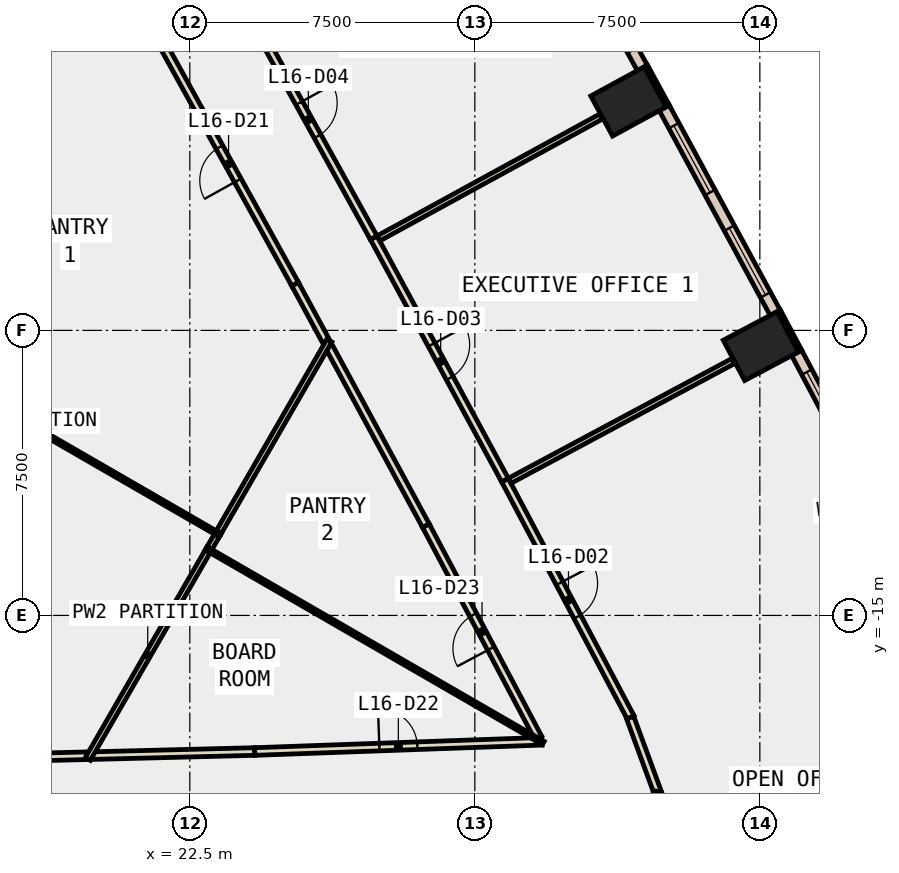
"""IFC4 building model, lengths in metres.
Left out: names, types, materials, properties, quantities, classifications, styles, units other than length and angle.
Written with IfcOpenShell. Run it as: python <this file> out.ifc"""

import sys

from ifc_helpers import new_model, si_unit, direction, frame, frame_2d, origin, origin_2d, place, context, subcontext, project, spatial, rectangle, extrude, element, fill, save


model = new_model("IFC4")
c1 = context("Model", 3, precision=1e-05, world=origin(), true_north=direction((0.0, 1.0)))
c2 = subcontext(c1, "Body", "Model", "MODEL_VIEW")
j1 = project(units=[si_unit("LENGTHUNIT", "METRE"), si_unit("PLANEANGLEUNIT", "RADIAN")], contexts=[c1])
p1 = place(None, origin())
s1 = spatial("IfcSite", under=j1, at=p1, CompositionType="ELEMENT")
p2 = place(p1, origin())
s2 = spatial("IfcBuilding", under=s1, at=p2, CompositionType="ELEMENT")
p3 = place(p2, frame((0.0, 0.0, 77.0)))
s3 = spatial("IfcBuildingStorey", under=s2, at=p3, CompositionType="ELEMENT", Elevation=77.0)
for number, where, z_axis, x_axis in (
    (1, (37.526, -7.914, -0.4), (0.0, 0.0, 1.0), (-0.469, 0.883, 0.0)),
    (2, (34.041, -1.477, -0.4), (0.0, 0.0, 1.0), (-0.478, 0.878, 0.0)),
):
    element("IfcColumn", number, at=place(p3, frame(where, z_axis=z_axis, x_axis=x_axis)), inside=s3, PredefinedType="COLUMN", context=c2, shape_type="SweptSolid", body=[
        extrude(rectangle(XDim=1.2, YDim=1.6, at=origin_2d()), origin(), (0.0, 0.0, 1.0), 4.0),
    ])
p4 = place(p3, frame((38.558, -8.045, 0.0), z_axis=(0.0, 0.0, 1.0), x_axis=(-0.469467784567, 0.882949601763, 0.0)))
e3 = element("IfcWall", 3, at=p4, inside=s3, PredefinedType="STANDARD", context=c2, shape_type="SweptSolid", body=[
    extrude(rectangle(XDim=1.199, YDim=0.1, at=frame_2d((0.6, 0.0))), origin(), (0.0, 0.0, 1.0), 3.6),
])
p5 = place(p3, frame((35.074, -1.598, 0.0), z_axis=(0.0, 0.0, 1.0), x_axis=(-0.478267644701, 0.878214131082, 0.0)))
e4 = element("IfcWall", 4, at=p5, inside=s3, PredefinedType="STANDARD", context=c2, shape_type="SweptSolid", body=[
    extrude(rectangle(XDim=1.2, YDim=0.1, at=frame_2d((0.6, 0.0))), origin(), (0.0, 0.0, 1.0), 3.6),
])
p6 = place(p3, frame((41.409, -13.644, 0.0), z_axis=(0.0, 0.0, 1.0), x_axis=(-0.467968066899, 0.883745375299, 0.0)))
e5 = element("IfcWall", 5, at=p6, inside=s3, PredefinedType="STANDARD", context=c2, shape_type="SweptSolid", body=[
    extrude(rectangle(XDim=6.282, YDim=0.3, at=frame_2d((3.141, 0.0))), origin(), (0.0, 0.0, 1.0), 3.6),
])
p7 = place(p6, frame((0.571, 0.0, 0.9)))
e6 = element("IfcOpeningElement", 6, at=p7, cuts=e5, PredefinedType="OPENING", context=c2, shape_type="SweptSolid", body=[
    extrude(rectangle(XDim=2.0, YDim=2.6, at=frame_2d((1.0, 1.3))), frame((0.0, 0.16, 0.0), z_axis=(0.0, -1.0, 0.0), x_axis=(1.0, 0.0, 0.0)), (0.0, 0.0, 1.0), 0.32),
])
p8 = place(p6, frame((3.712, 0.0, 0.9)))
e7 = element("IfcOpeningElement", 7, at=p8, cuts=e5, PredefinedType="OPENING", context=c2, shape_type="SweptSolid", body=[
    extrude(rectangle(XDim=2.0, YDim=2.6, at=frame_2d((1.0, 1.3))), frame((0.0, 0.16, 0.0), z_axis=(0.0, -1.0, 0.0), x_axis=(1.0, 0.0, 0.0)), (0.0, 0.0, 1.0), 0.32),
])
p9 = place(p3, frame((37.903, -7.036, 0.0), z_axis=(0.0, 0.0, 1.0), x_axis=(-0.476174096946, 0.879351027404, 0.0)))
e8 = element("IfcWall", 8, at=p9, inside=s3, PredefinedType="STANDARD", context=c2, shape_type="SweptSolid", body=[
    extrude(rectangle(XDim=6.131, YDim=0.3, at=frame_2d((3.065, 0.0))), origin(), (0.0, 0.0, 1.0), 3.6),
])
p10 = place(p9, frame((0.533, 0.0, 0.9)))
e9 = element("IfcOpeningElement", 9, at=p10, cuts=e8, PredefinedType="OPENING", context=c2, shape_type="SweptSolid", body=[
    extrude(rectangle(XDim=2.0, YDim=2.6, at=frame_2d((1.0, 1.3))), frame((0.0, 0.16, 0.0), z_axis=(0.0, -1.0, 0.0), x_axis=(1.0, 0.0, 0.0)), (0.0, 0.0, 1.0), 0.32),
])
p11 = place(p9, frame((3.598, 0.0, 0.9)))
e10 = element("IfcOpeningElement", 10, at=p11, cuts=e8, PredefinedType="OPENING", context=c2, shape_type="SweptSolid", body=[
    extrude(rectangle(XDim=2.0, YDim=2.6, at=frame_2d((1.0, 1.3))), frame((0.0, 0.16, 0.0), z_axis=(0.0, -1.0, 0.0), x_axis=(1.0, 0.0, 0.0)), (0.0, 0.0, 1.0), 0.32),
])
p12 = place(p3, frame((34.409, -0.595, 0.0), z_axis=(0.0, 0.0, 1.0), x_axis=(-0.484025698618, 0.875053782963, 0.0)))
e11 = element("IfcWall", 11, at=p12, inside=s3, PredefinedType="STANDARD", context=c2, shape_type="SweptSolid", body=[
    extrude(rectangle(XDim=6.13, YDim=0.3, at=frame_2d((3.065, 0.0))), origin(), (0.0, 0.0, 1.0), 3.6),
])
p13 = place(p12, frame((0.532, 0.0, 0.9)))
e12 = element("IfcOpeningElement", 12, at=p13, cuts=e11, PredefinedType="OPENING", context=c2, shape_type="SweptSolid", body=[
    extrude(rectangle(XDim=2.0, YDim=2.6, at=frame_2d((1.0, 1.3))), frame((0.0, 0.16, 0.0), z_axis=(0.0, -1.0, 0.0), x_axis=(1.0, 0.0, 0.0)), (0.0, 0.0, 1.0), 0.32),
])
p14 = place(p12, frame((3.597, 0.0, 0.9)))
e13 = element("IfcOpeningElement", 13, at=p14, cuts=e11, PredefinedType="OPENING", context=c2, shape_type="SweptSolid", body=[
    extrude(rectangle(XDim=2.0, YDim=2.6, at=frame_2d((1.0, 1.3))), frame((0.0, 0.16, 0.0), z_axis=(0.0, -1.0, 0.0), x_axis=(1.0, 0.0, 0.0)), (0.0, 0.0, 1.0), 0.32),
])
p15 = place(p3, frame((15.951, -18.789, 0.0), z_axis=(0.0, 0.0, 1.0), x_axis=(0.999680018084, 0.025295482688, 0.0)))
e14 = element("IfcWall", 14, at=p15, inside=s3, PredefinedType="PARTITIONING", context=c2, shape_type="SweptSolid", body=[
    extrude(rectangle(XDim=3.841, YDim=0.2, at=frame_2d((1.921, 0.0))), origin(), (0.0, 0.0, 1.0), 3.6),
])
p16 = place(p3, frame((26.086, -7.789, 0.0), z_axis=(0.0, 0.0, 1.0), x_axis=(-0.475856505621, 0.879522930945, 0.0)))
e15 = element("IfcWall", 15, at=p16, inside=s3, PredefinedType="PARTITIONING", context=c2, shape_type="SweptSolid", body=[
    extrude(rectangle(XDim=1.715, YDim=0.2, at=frame_2d((0.857, 0.0))), origin(), (0.0, 0.0, 1.0), 3.6),
])
p17 = place(p3, frame((25.27, -6.281, 0.0), z_axis=(0.0, 0.0, 1.0), x_axis=(-0.484062485326, 0.875033433818, 0.0)))
e16 = element("IfcWall", 16, at=p17, inside=s3, PredefinedType="PARTITIONING", context=c2, shape_type="SweptSolid", body=[
    extrude(rectangle(XDim=7.23, YDim=0.2, at=frame_2d((3.615, 0.0))), origin(), (0.0, 0.0, 1.0), 3.6),
])
p18 = place(p17, frame((3.115, 0.0, 0.0)))
e17 = element("IfcOpeningElement", 17, at=p18, cuts=e16, PredefinedType="OPENING", context=c2, shape_type="SweptSolid", body=[
    extrude(rectangle(XDim=1.0, YDim=2.1, at=frame_2d((0.5, 1.05))), frame((0.0, 0.11, 0.0), z_axis=(0.0, -1.0, 0.0), x_axis=(1.0, 0.0, 0.0)), (0.0, 0.0, 1.0), 0.22),
])
p19 = place(p3, frame((19.941, -18.689, 0.0), z_axis=(0.0, 0.0, 1.0), x_axis=(0.999680388185, 0.025280852018, 0.0)))
e18 = element("IfcWall", 18, at=p19, inside=s3, PredefinedType="PARTITIONING", context=c2, shape_type="SweptSolid", body=[
    extrude(rectangle(XDim=4.269, YDim=0.2, at=frame_2d((2.134, 0.0))), origin(), (0.0, 0.0, 1.0), 3.6),
])
p20 = place(p3, frame((24.208, -18.581, 0.0), z_axis=(0.0, 0.0, 1.0), x_axis=(0.99936260762, 0.035698438215, 0.0)))
e19 = element("IfcWall", 19, at=p20, inside=s3, PredefinedType="PARTITIONING", context=c2, shape_type="SweptSolid", body=[
    extrude(rectangle(XDim=7.564, YDim=0.2, at=frame_2d((3.782, 0.0))), origin(), (0.0, 0.0, 1.0), 3.6),
])
p21 = place(p20, frame((3.282, 0.0, 0.0)))
e20 = element("IfcOpeningElement", 20, at=p21, cuts=e19, PredefinedType="OPENING", context=c2, shape_type="SweptSolid", body=[
    extrude(rectangle(XDim=1.0, YDim=2.1, at=frame_2d((0.5, 1.05))), frame((0.0, 0.11, 0.0), z_axis=(0.0, -1.0, 0.0), x_axis=(1.0, 0.0, 0.0)), (0.0, 0.0, 1.0), 0.22),
])
p22 = place(p3, frame((31.668, -18.219, 0.0), z_axis=(0.0, 0.0, 1.0), x_axis=(-0.468058220157, 0.883697630722, 0.0)))
e21 = element("IfcWall", 21, at=p22, inside=s3, PredefinedType="PARTITIONING", context=c2, shape_type="SweptSolid", body=[
    extrude(rectangle(XDim=6.316, YDim=0.2, at=frame_2d((3.158, 0.0))), origin(), (0.0, 0.0, 1.0), 3.6),
])
p23 = place(p22, frame((2.658, 0.0, 0.0)))
e22 = element("IfcOpeningElement", 22, at=p23, cuts=e21, PredefinedType="OPENING", context=c2, shape_type="SweptSolid", body=[
    extrude(rectangle(XDim=1.0, YDim=2.1, at=frame_2d((0.5, 1.05))), frame((0.0, 0.11, 0.0), z_axis=(0.0, -1.0, 0.0), x_axis=(1.0, 0.0, 0.0)), (0.0, 0.0, 1.0), 0.22),
])
p24 = place(p3, frame((28.712, -12.638, 0.0), z_axis=(0.0, 0.0, 1.0), x_axis=(-0.476123321927, 0.8793785205, 0.0)))
e23 = element("IfcWall", 23, at=p24, inside=s3, PredefinedType="PARTITIONING", context=c2, shape_type="SweptSolid", body=[
    extrude(rectangle(XDim=5.364, YDim=0.2, at=frame_2d((2.682, 0.0))), origin(), (0.0, 0.0, 1.0), 3.6),
])
p25 = place(p3, frame((30.793, -11.439, 0.0), z_axis=(0.0, 0.0, 1.0), x_axis=(0.468043291185, -0.883705537822, 0.0)))
e24 = element("IfcWall", 24, at=p25, inside=s3, PredefinedType="PARTITIONING", context=c2, shape_type="SweptSolid", body=[
    extrude(rectangle(XDim=7.066, YDim=0.2, at=frame_2d((3.533, 0.0))), origin(), (0.0, 0.0, 1.0), 3.6),
])
p26 = place(p25, frame((3.071, 0.0, 0.0)))
e25 = element("IfcOpeningElement", 25, at=p26, cuts=e24, PredefinedType="OPENING", context=c2, shape_type="SweptSolid", body=[
    extrude(rectangle(XDim=1.0, YDim=2.1, at=frame_2d((0.5, 1.05))), frame((0.0, 0.11, 0.0), z_axis=(0.0, -1.0, 0.0), x_axis=(1.0, 0.0, 0.0)), (0.0, 0.0, 1.0), 0.22),
])
p27 = place(p3, frame((34.088, -17.689, 0.0), z_axis=(0.0, 0.0, 1.0), x_axis=(0.34459875492, -0.938750072228, 0.0)))
e26 = element("IfcWall", 26, at=p27, inside=s3, PredefinedType="PARTITIONING", context=c2, shape_type="SweptSolid", body=[
    extrude(rectangle(XDim=2.168, YDim=0.2, at=frame_2d((1.084, 0.0))), origin(), (0.0, 0.0, 1.0), 3.6),
])
p28 = place(p3, frame((34.801, -19.631, 0.0), z_axis=(0.0, 0.0, 1.0), x_axis=(-0.212292845768, -0.977206092713, 0.0)))
e27 = element("IfcWall", 27, at=p28, inside=s3, PredefinedType="PARTITIONING", context=c2, shape_type="SweptSolid", body=[
    extrude(rectangle(XDim=0.519, YDim=0.2, at=frame_2d((0.259, 0.0))), origin(), (0.0, 0.0, 1.0), 3.6),
])
p29 = place(p3, frame((27.339, -5.062, 0.0), z_axis=(0.0, 0.0, 1.0), x_axis=(0.476248444599, -0.879310763619, 0.0)))
e28 = element("IfcWall", 28, at=p29, inside=s3, PredefinedType="PARTITIONING", context=c2, shape_type="SweptSolid", body=[
    extrude(rectangle(XDim=7.252, YDim=0.2, at=frame_2d((3.626, 0.0))), origin(), (0.0, 0.0, 1.0), 3.6),
])
p30 = place(p29, frame((3.201, 0.0, 0.0)))
e29 = element("IfcOpeningElement", 29, at=p30, cuts=e28, PredefinedType="OPENING", context=c2, shape_type="SweptSolid", body=[
    extrude(rectangle(XDim=1.0, YDim=2.1, at=frame_2d((0.5, 1.05))), frame((0.0, 0.11, 0.0), z_axis=(0.0, -1.0, 0.0), x_axis=(1.0, 0.0, 0.0)), (0.0, 0.0, 1.0), 0.22),
])
p31 = place(p3, frame((23.828, 1.283, 0.0), z_axis=(0.0, 0.0, 1.0), x_axis=(0.484064127728, -0.875032525251, 0.0)))
e30 = element("IfcWall", 30, at=p31, inside=s3, PredefinedType="PARTITIONING", context=c2, shape_type="SweptSolid", body=[
    extrude(rectangle(XDim=7.251, YDim=0.2, at=frame_2d((3.625, 0.0))), origin(), (0.0, 0.0, 1.0), 3.6),
])
p32 = place(p31, frame((3.201, 0.0, 0.0)))
e31 = element("IfcOpeningElement", 31, at=p32, cuts=e30, PredefinedType="OPENING", context=c2, shape_type="SweptSolid", body=[
    extrude(rectangle(XDim=1.0, YDim=2.1, at=frame_2d((0.5, 1.05))), frame((0.0, 0.11, 0.0), z_axis=(0.0, -1.0, 0.0), x_axis=(1.0, 0.0, 0.0)), (0.0, 0.0, 1.0), 0.22),
])
p33 = place(p3, frame((19.374, 4.458, 0.0), z_axis=(0.0, 0.0, 1.0), x_axis=(-0.499973880856, -0.866040483154, 0.0)))
e32 = element("IfcWall", 32, at=p33, inside=s3, PredefinedType="PARTITIONING", context=c2, shape_type="SweptSolid", body=[
    extrude(rectangle(XDim=13.113, YDim=0.2, at=frame_2d((6.556, 0.0))), origin(), (0.0, 0.0, 1.0), 3.6),
])
p34 = place(p3, frame((12.843, -6.855, 0.0), z_axis=(0.0, 0.0, 1.0), x_axis=(0.866054959007, -0.499948805358, 0.0)))
e33 = element("IfcWall", 33, at=p34, inside=s3, PredefinedType="PARTITIONING", context=c2, shape_type="SweptSolid", body=[
    extrude(rectangle(XDim=12.075, YDim=0.1, at=frame_2d((6.038, 0.0))), origin(), (0.0, 0.0, 1.0), 3.6),
])
p35 = place(p3, frame((22.969, -13.316, 0.0), z_axis=(0.0, 0.0, 1.0), x_axis=(-0.500007312183, -0.866021182053, 0.0)))
e34 = element("IfcWall", 34, at=p35, inside=s3, PredefinedType="PARTITIONING", context=c2, shape_type="SweptSolid", body=[
    extrude(rectangle(XDim=6.306, YDim=0.15, at=frame_2d((3.153, 0.0))), origin(), (0.0, 0.0, 1.0), 3.6),
])
p36 = place(p3, frame((23.211, -12.898, 0.0), z_axis=(0.0, 0.0, 1.0), x_axis=(-0.501488909663, -0.865164073159, 0.0)))
e35 = element("IfcWall", 35, at=p36, inside=s3, PredefinedType="PARTITIONING", context=c2, shape_type="SweptSolid", body=[
    extrude(rectangle(XDim=0.383, YDim=0.15, at=frame_2d((0.191, 0.0))), origin(), (0.0, 0.0, 1.0), 3.6),
])
p37 = place(p3, frame((26.172, -7.768, 0.0), z_axis=(0.0, 0.0, 1.0), x_axis=(-0.499945058274, -0.866057122081, 0.0)))
e36 = element("IfcWall", 36, at=p37, inside=s3, PredefinedType="PARTITIONING", context=c2, shape_type="SweptSolid", body=[
    extrude(rectangle(XDim=5.823, YDim=0.15, at=frame_2d((2.912, 0.0))), origin(), (0.0, 0.0, 1.0), 3.6),
])
p38 = place(p3, frame((22.929, -13.235, 0.0), z_axis=(0.0, 0.0, 1.0), x_axis=(0.866003823807, -0.500037375755, 0.0)))
e37 = element("IfcWall", 37, at=p38, inside=s3, PredefinedType="PARTITIONING", context=c2, shape_type="SweptSolid", body=[
    extrude(rectangle(XDim=10.245, YDim=0.1, at=frame_2d((5.123, 0.0))), origin(), (0.0, 0.0, 1.0), 3.6),
])
p39 = place(p3, frame((30.916, -11.458, 0.0), z_axis=(0.0, 0.0, 1.0), x_axis=(0.881525059883, 0.472137235132, 0.0)))
e38 = element("IfcWall", 38, at=p39, inside=s3, PredefinedType="PARTITIONING", context=c2, shape_type="SweptSolid", body=[
    extrude(rectangle(XDim=6.68, YDim=0.15, at=frame_2d((3.34, 0.0))), origin(), (0.0, 0.0, 1.0), 3.6),
])
p40 = place(p3, frame((27.463, -5.08, 0.0), z_axis=(0.0, 0.0, 1.0), x_axis=(0.877227104806, 0.480075625911, 0.0)))
e39 = element("IfcWall", 39, at=p40, inside=s3, PredefinedType="PARTITIONING", context=c2, shape_type="SweptSolid", body=[
    extrude(rectangle(XDim=6.68, YDim=0.15, at=frame_2d((3.34, 0.0))), origin(), (0.0, 0.0, 1.0), 3.6),
])
p41 = place(p8, origin())
e40 = element("IfcWindow", 40, at=p41, inside=s3, PartitioningType="SINGLE_PANEL", PredefinedType="WINDOW", context=c2, shape_type="SweptSolid", body=[
    extrude(rectangle(XDim=2.0, YDim=2.6, at=frame_2d((1.0, 1.3))), frame((0.0, 0.03, 0.0), z_axis=(0.0, -1.0, 0.0), x_axis=(1.0, 0.0, 0.0)), (0.0, 0.0, 1.0), 0.06),
])
fill(e7, e40)
p42 = place(p10, origin())
e41 = element("IfcWindow", 41, at=p42, inside=s3, PartitioningType="SINGLE_PANEL", PredefinedType="WINDOW", context=c2, shape_type="SweptSolid", body=[
    extrude(rectangle(XDim=2.0, YDim=2.6, at=frame_2d((1.0, 1.3))), frame((0.0, 0.03, 0.0), z_axis=(0.0, -1.0, 0.0), x_axis=(1.0, 0.0, 0.0)), (0.0, 0.0, 1.0), 0.06),
])
fill(e9, e41)
p43 = place(p11, origin())
e42 = element("IfcWindow", 42, at=p43, inside=s3, PartitioningType="SINGLE_PANEL", PredefinedType="WINDOW", context=c2, shape_type="SweptSolid", body=[
    extrude(rectangle(XDim=2.0, YDim=2.6, at=frame_2d((1.0, 1.3))), frame((0.0, 0.03, 0.0), z_axis=(0.0, -1.0, 0.0), x_axis=(1.0, 0.0, 0.0)), (0.0, 0.0, 1.0), 0.06),
])
fill(e10, e42)
p44 = place(p26, origin())
e43 = element("IfcDoor", 43, at=p44, inside=s3, OperationType="SINGLE_SWING_RIGHT", PredefinedType="DOOR", context=c2, shape_type="SweptSolid", body=[
    extrude(rectangle(XDim=1.0, YDim=2.1, at=frame_2d((0.5, 1.05))), frame((0.0, 0.025, 0.0), z_axis=(0.0, -1.0, 0.0), x_axis=(1.0, 0.0, 0.0)), (0.0, 0.0, 1.0), 0.05),
])
fill(e25, e43)
p45 = place(p30, origin())
e44 = element("IfcDoor", 44, at=p45, inside=s3, OperationType="SINGLE_SWING_LEFT", PredefinedType="DOOR", context=c2, shape_type="SweptSolid", body=[
    extrude(rectangle(XDim=1.0, YDim=2.1, at=frame_2d((0.5, 1.05))), frame((0.0, 0.025, 0.0), z_axis=(0.0, -1.0, 0.0), x_axis=(1.0, 0.0, 0.0)), (0.0, 0.0, 1.0), 0.05),
])
fill(e29, e44)
p46 = place(p32, origin())
e45 = element("IfcDoor", 45, at=p46, inside=s3, OperationType="SINGLE_SWING_LEFT", PredefinedType="DOOR", context=c2, shape_type="SweptSolid", body=[
    extrude(rectangle(XDim=1.0, YDim=2.1, at=frame_2d((0.5, 1.05))), frame((0.0, 0.025, 0.0), z_axis=(0.0, -1.0, 0.0), x_axis=(1.0, 0.0, 0.0)), (0.0, 0.0, 1.0), 0.05),
])
fill(e31, e45)
p47 = place(p18, origin())
e46 = element("IfcDoor", 46, at=p47, inside=s3, OperationType="SINGLE_SWING_RIGHT", PredefinedType="DOOR", context=c2, shape_type="SweptSolid", body=[
    extrude(rectangle(XDim=1.0, YDim=2.1, at=frame_2d((0.5, 1.05))), frame((0.0, 0.025, 0.0), z_axis=(0.0, -1.0, 0.0), x_axis=(1.0, 0.0, 0.0)), (0.0, 0.0, 1.0), 0.05),
])
fill(e17, e46)
p48 = place(p21, origin())
e47 = element("IfcDoor", 47, at=p48, inside=s3, OperationType="SINGLE_SWING_LEFT", PredefinedType="DOOR", context=c2, shape_type="SweptSolid", body=[
    extrude(rectangle(XDim=1.0, YDim=2.1, at=frame_2d((0.5, 1.05))), frame((0.0, 0.025, 0.0), z_axis=(0.0, -1.0, 0.0), x_axis=(1.0, 0.0, 0.0)), (0.0, 0.0, 1.0), 0.05),
])
fill(e20, e47)
p49 = place(p23, origin())
e48 = element("IfcDoor", 48, at=p49, inside=s3, OperationType="SINGLE_SWING_LEFT", PredefinedType="DOOR", context=c2, shape_type="SweptSolid", body=[
    extrude(rectangle(XDim=1.0, YDim=2.1, at=frame_2d((0.5, 1.05))), frame((0.0, 0.025, 0.0), z_axis=(0.0, -1.0, 0.0), x_axis=(1.0, 0.0, 0.0)), (0.0, 0.0, 1.0), 0.05),
])
fill(e22, e48)
save(model, sys.argv[1])
